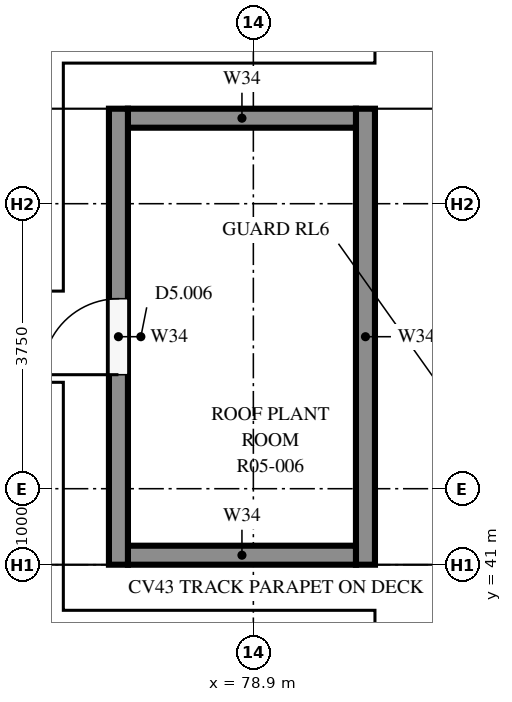
"""IFC4 building model, lengths in metres.
Left out: names, types, materials, properties, quantities, classifications, styles, units other than length and angle.
Written with IfcOpenShell. Run it as: python <this file> out.ifc"""

import sys

from ifc_helpers import new_model, si_unit, direction, frame, frame_2d, origin, place, context, subcontext, project, spatial, rectangle, extrude, element, fill, save


model = new_model("IFC4")
c1 = context("Model", 3, precision=1e-05, world=origin(), true_north=direction((0.0, 1.0)))
c2 = subcontext(c1, "Body", "Model", "MODEL_VIEW")
j1 = project(units=[si_unit("LENGTHUNIT", "METRE"), si_unit("PLANEANGLEUNIT", "RADIAN")], contexts=[c1])
p1 = place(None, origin())
s1 = spatial("IfcSite", under=j1, at=p1, CompositionType="ELEMENT")
p2 = place(p1, origin())
s2 = spatial("IfcBuilding", under=s1, at=p2, CompositionType="ELEMENT")
p3 = place(p2, frame((0.0, 0.0, 18.9)))
s3 = spatial("IfcBuildingStorey", under=s2, at=p3, CompositionType="ELEMENT", Elevation=18.9)
p4 = place(p3, frame((77.125, 41.0, 0.0), z_axis=(0.0, 0.0, 1.0), x_axis=(0.0, 1.0, 0.0)))
e1 = element("IfcWall", 1, at=p4, inside=s3, PredefinedType="SOLIDWALL", context=c2, shape_type="SweptSolid", body=[
    extrude(rectangle(XDim=6.0, YDim=0.25, at=frame_2d((3.0, 0.0))), origin(), (0.0, 0.0, 1.0), 2.6),
])
p5 = place(p4, frame((2.5, 0.0, 0.0)))
e2 = element("IfcOpeningElement", 2, at=p5, cuts=e1, PredefinedType="OPENING", context=c2, shape_type="SweptSolid", body=[
    extrude(rectangle(XDim=1.0, YDim=2.1, at=frame_2d((0.5, 1.05))), frame((0.0, 0.135, 0.0), z_axis=(0.0, -1.0, 0.0), x_axis=(1.0, 0.0, 0.0)), (0.0, 0.0, 1.0), 0.27),
])
p6 = place(p3, frame((80.375, 47.0, 0.0), z_axis=(0.0, 0.0, 1.0), x_axis=(0.0, -1.0, 0.0)))
e3 = element("IfcWall", 3, at=p6, inside=s3, PredefinedType="SOLIDWALL", context=c2, shape_type="SweptSolid", body=[
    extrude(rectangle(XDim=6.0, YDim=0.25, at=frame_2d((3.0, 0.0))), origin(), (0.0, 0.0, 1.0), 2.6),
])
for number, where, z_axis, x_axis in (
    (4, (77.25, 41.125, 0.0), (0.0, 0.0, 1.0), (1.0, 0.0, 0.0)),
    (5, (77.25, 46.875, 0.0), (0.0, 0.0, 1.0), (1.0, 0.0, 0.0)),
):
    element("IfcWall", number, at=place(p3, frame(where, z_axis=z_axis, x_axis=x_axis)), inside=s3, PredefinedType="SOLIDWALL", context=c2, shape_type="SweptSolid", body=[
        extrude(rectangle(XDim=3.0, YDim=0.25, at=frame_2d((1.5, 0.0))), origin(), (0.0, 0.0, 1.0), 2.6),
    ])
p7 = place(p5, origin())
e6 = element("IfcDoor", 6, at=p7, inside=s3, OperationType="SINGLE_SWING_LEFT", PredefinedType="DOOR", context=c2, shape_type="SweptSolid", body=[
    extrude(rectangle(XDim=1.0, YDim=2.1, at=frame_2d((0.5, 1.05))), frame((0.0, 0.025, 0.0), z_axis=(0.0, -1.0, 0.0), x_axis=(1.0, 0.0, 0.0)), (0.0, 0.0, 1.0), 0.05),
])
fill(e2, e6)
save(model, sys.argv[1])
